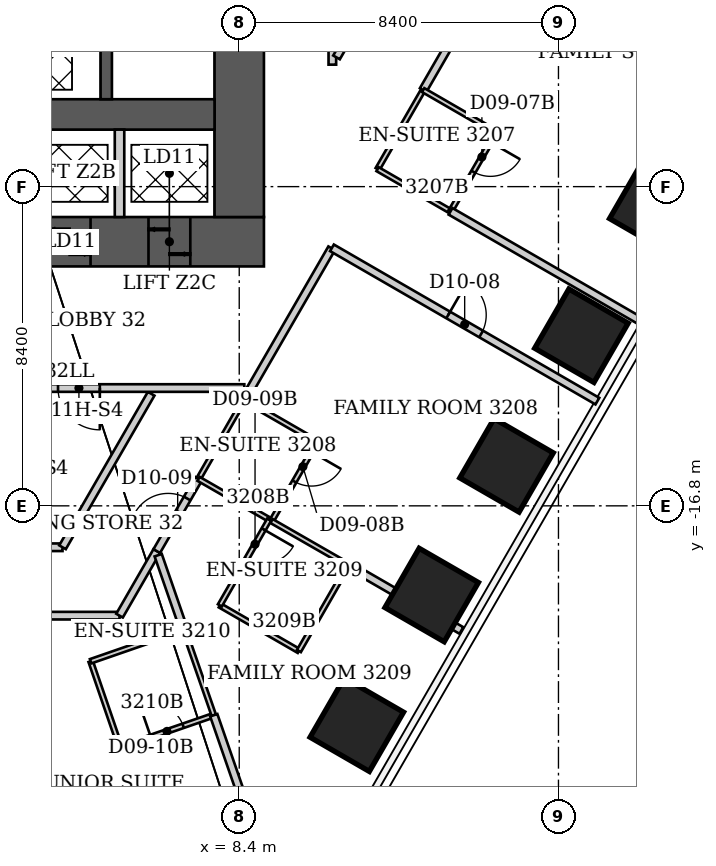
"""IFC4 building model, lengths in metres.
Left out: names, types, materials, properties, quantities, classifications, styles, units other than length and angle.
Written with IfcOpenShell. Run it as: python <this file> out.ifc"""

import sys

from ifc_helpers import new_model, si_unit, direction, frame, frame_2d, origin, origin_2d, place, context, subcontext, project, spatial, rectangle, extrude, element, fill, save


model = new_model("IFC4")
c1 = context("Model", 3, precision=1e-05, world=origin(), true_north=direction((0.0, 1.0)))
c2 = subcontext(c1, "Body", "Model", "MODEL_VIEW")
j1 = project(units=[si_unit("LENGTHUNIT", "METRE"), si_unit("PLANEANGLEUNIT", "RADIAN")], contexts=[c1])
p1 = place(None, origin())
s1 = spatial("IfcSite", under=j1, at=p1, CompositionType="ELEMENT")
p2 = place(p1, origin())
s2 = spatial("IfcBuilding", under=s1, at=p2, CompositionType="ELEMENT")
p3 = place(p2, frame((0.0, 0.0, 131.0)))
s3 = spatial("IfcBuildingStorey", under=s2, at=p3, CompositionType="ELEMENT", Elevation=131.0)
for number, where, z_axis, x_axis in (
    (1, (19.374, -8.911, 0.0), (0.0, 0.0, 1.0), (0.866, -0.5, 0.0)),
    (2, (17.404, -12.323, 0.0), (0.0, 0.0, 1.0), (0.866, -0.5, 0.0)),
    (3, (15.434, -15.735, 0.0), (0.0, 0.0, 1.0), (0.866, -0.5, 0.0)),
    (4, (13.464, -19.147, 0.0), (0.0, 0.0, 1.0), (0.866, -0.5, 0.0)),
    (5, (11.494, -22.559, 0.0), (0.0, 0.0, 1.0), (0.866, -0.5, 0.0)),
):
    element("IfcColumn", number, at=place(p3, frame(where, z_axis=z_axis, x_axis=x_axis)), inside=s3, PredefinedType="COLUMN", context=c2, shape_type="SweptSolid", body=[
        extrude(rectangle(XDim=1.8, YDim=1.8, at=origin_2d()), origin(), (0.0, 0.0, 1.0), 3.8),
    ])
p4 = place(p3, frame((-9.05, -9.85, 0.0), z_axis=(0.0, 0.0, 1.0), x_axis=(1.0, 0.0, 0.0)))
e6 = element("IfcWall", 6, at=p4, inside=s3, PredefinedType="SHEAR", context=c2, shape_type="SweptSolid", body=[
    extrude(rectangle(XDim=18.1, YDim=1.3, at=frame_2d((9.05, 0.0))), origin(), (0.0, 0.0, 1.0), 3.8),
])
p5 = place(p4, frame((1.938, 0.0, 0.0)))
e7 = element("IfcOpeningElement", 7, at=p5, cuts=e6, PredefinedType="OPENING", context=c2, shape_type="SweptSolid", body=[
    extrude(rectangle(XDim=1.1, YDim=2.2, at=frame_2d((0.55, 1.1))), frame((0.0, 0.65, 0.0), z_axis=(0.0, -1.0, 0.0), x_axis=(1.0, 0.0, 0.0)), (0.0, 0.0, 1.0), 1.3),
])
p6 = place(p4, frame((9.812, 0.0, 0.0)))
e8 = element("IfcOpeningElement", 8, at=p6, cuts=e6, PredefinedType="OPENING", context=c2, shape_type="SweptSolid", body=[
    extrude(rectangle(XDim=1.1, YDim=2.1, at=frame_2d((0.55, 1.05))), frame((0.0, 0.65, 0.0), z_axis=(0.0, -1.0, 0.0), x_axis=(1.0, 0.0, 0.0)), (0.0, 0.0, 1.0), 1.3),
])
p7 = place(p4, frame((12.438, 0.0, 0.0)))
e9 = element("IfcOpeningElement", 9, at=p7, cuts=e6, PredefinedType="OPENING", context=c2, shape_type="SweptSolid", body=[
    extrude(rectangle(XDim=1.1, YDim=2.1, at=frame_2d((0.55, 1.05))), frame((0.0, 0.65, 0.0), z_axis=(0.0, -1.0, 0.0), x_axis=(1.0, 0.0, 0.0)), (0.0, 0.0, 1.0), 1.3),
])
p8 = place(p4, frame((15.062, 0.0, 0.0)))
e10 = element("IfcOpeningElement", 10, at=p8, cuts=e6, PredefinedType="OPENING", context=c2, shape_type="SweptSolid", body=[
    extrude(rectangle(XDim=1.1, YDim=2.1, at=frame_2d((0.55, 1.05))), frame((0.0, 0.65, 0.0), z_axis=(0.0, -1.0, 0.0), x_axis=(1.0, 0.0, 0.0)), (0.0, 0.0, 1.0), 1.3),
])
p9 = place(p3, frame((8.4, -9.2, 0.0), z_axis=(0.0, 0.0, 1.0), x_axis=(0.0, 1.0, 0.0)))
e11 = element("IfcWall", 11, at=p9, inside=s3, PredefinedType="SHEAR", context=c2, shape_type="SweptSolid", body=[
    extrude(rectangle(XDim=15.3, YDim=1.3, at=frame_2d((7.65, 0.0))), origin(), (0.0, 0.0, 1.0), 3.8),
])
p10 = place(p9, frame((10.7, 0.0, 0.0)))
e12 = element("IfcOpeningElement", 12, at=p10, cuts=e11, PredefinedType="OPENING", context=c2, shape_type="SweptSolid", body=[
    extrude(rectangle(XDim=1.2, YDim=2.2, at=frame_2d((0.6, 1.1))), frame((0.0, 0.65, 0.0), z_axis=(0.0, -1.0, 0.0), x_axis=(1.0, 0.0, 0.0)), (0.0, 0.0, 1.0), 1.3),
])
p11 = place(p3, frame((-7.75, -6.5, 0.0), z_axis=(0.0, 0.0, 1.0), x_axis=(1.0, 0.0, 0.0)))
e13 = element("IfcWall", 13, at=p11, inside=s3, PredefinedType="SHEAR", context=c2, shape_type="SweptSolid", body=[
    extrude(rectangle(XDim=15.5, YDim=0.8, at=frame_2d((7.75, 0.0))), origin(), (0.0, 0.0, 1.0), 3.8),
])
p12 = place(p3, frame((4.9, -6.1, 0.0), z_axis=(0.0, 0.0, 1.0), x_axis=(0.0, 1.0, 0.0)))
e14 = element("IfcWall", 14, at=p12, inside=s3, PredefinedType="SHEAR", context=c2, shape_type="SweptSolid", body=[
    extrude(rectangle(XDim=7.2, YDim=0.3, at=frame_2d((3.6, 0.0))), origin(), (0.0, 0.0, 1.0), 3.8),
])
p13 = place(p3, frame((5.25, -9.2, 0.0), z_axis=(0.0, 0.0, 1.0), x_axis=(0.0, 1.0, 0.0)))
e15 = element("IfcWall", 15, at=p13, inside=s3, PredefinedType="PARTITIONING", context=c2, shape_type="SweptSolid", body=[
    extrude(rectangle(XDim=2.3, YDim=0.25, at=frame_2d((1.15, 0.0))), origin(), (0.0, 0.0, 1.0), 3.8),
])
p14 = place(p3, frame((1.215, -19.69, 0.0), z_axis=(0.0, 0.0, 1.0), x_axis=(1.0, 0.0, 0.0)))
e16 = element("IfcWall", 16, at=p14, inside=s3, PredefinedType="PARTITIONING", context=c2, shape_type="SweptSolid", body=[
    extrude(rectangle(XDim=4.035, YDim=0.2, at=frame_2d((2.018, 0.0))), origin(), (0.0, 0.0, 1.0), 3.64),
])
p15 = place(p3, frame((3.75, -17.89, 0.0), z_axis=(0.0, 0.0, 1.0), x_axis=(-1.0, 0.0, 0.0)))
e17 = element("IfcWall", 17, at=p15, inside=s3, PredefinedType="PARTITIONING", context=c2, shape_type="SweptSolid", body=[
    extrude(rectangle(XDim=2.15, YDim=0.2, at=frame_2d((1.075, 0.0))), origin(), (0.0, 0.0, 1.0), 3.64),
])
p16 = place(p3, frame((4.49, -20.89, 0.0), z_axis=(0.0, 0.0, 1.0), x_axis=(0.324971746724, -0.945723724896, 0.0)))
e18 = element("IfcWall", 18, at=p16, inside=s3, PredefinedType="PARTITIONING", context=c2, shape_type="SweptSolid", body=[
    extrude(rectangle(XDim=2.4, YDim=0.12, at=frame_2d((1.2, 0.0))), origin(), (0.0, 0.0, 1.0), 3.64),
])
p17 = place(p3, frame((5.25, -19.69, 0.0), z_axis=(0.0, 0.0, 1.0), x_axis=(0.499431599995, 0.866353321068, 0.0)))
e19 = element("IfcWall", 19, at=p17, inside=s3, PredefinedType="PARTITIONING", context=c2, shape_type="SweptSolid", body=[
    extrude(rectangle(XDim=1.962, YDim=0.2, at=frame_2d((0.981, 0.0))), origin(), (0.0, 0.0, 1.0), 3.64),
])
p18 = place(p3, frame((5.27, -23.16, 0.0), z_axis=(0.0, 0.0, 1.0), x_axis=(0.945184415197, 0.326537013627, 0.0)))
e20 = element("IfcWall", 20, at=p18, inside=s3, PredefinedType="PARTITIONING", context=c2, shape_type="SweptSolid", body=[
    extrude(rectangle(XDim=2.603, YDim=0.12, at=frame_2d((1.301, 0.0))), origin(), (0.0, 0.0, 1.0), 3.64),
])
p19 = place(p18, frame((0.85, 0.0, 0.0)))
e21 = element("IfcOpeningElement", 21, at=p19, cuts=e20, PredefinedType="OPENING", context=c2, shape_type="SweptSolid", body=[
    extrude(rectangle(XDim=0.9, YDim=2.03, at=frame_2d((0.45, 1.015))), frame((0.0, 0.06, 0.0), z_axis=(0.0, -1.0, 0.0), x_axis=(1.0, 0.0, 0.0)), (0.0, 0.0, 1.0), 0.12),
])
p20 = place(p3, frame((6.083, -13.85, 0.0), z_axis=(0.0, 0.0, 1.0), x_axis=(-0.499977643516, -0.866038310922, 0.0)))
e22 = element("IfcWall", 22, at=p20, inside=s3, PredefinedType="PARTITIONING", context=c2, shape_type="SweptSolid", body=[
    extrude(rectangle(XDim=4.665, YDim=0.2, at=frame_2d((2.333, 0.0))), origin(), (0.0, 0.0, 1.0), 3.64),
])
p21 = place(p3, frame((6.23, -17.99, 0.0), z_axis=(0.0, 0.0, 1.0), x_axis=(0.500957366999, 0.865471961677, 0.0)))
e23 = element("IfcWall", 23, at=p21, inside=s3, PredefinedType="PARTITIONING", context=c2, shape_type="SweptSolid", body=[
    extrude(rectangle(XDim=2.196, YDim=0.2, at=frame_2d((1.098, 0.0))), origin(), (0.0, 0.0, 1.0), 3.64),
])
p22 = place(p21, frame((0.598, 0.0, 0.0)))
e24 = element("IfcOpeningElement", 24, at=p22, cuts=e23, PredefinedType="OPENING", context=c2, shape_type="SweptSolid", body=[
    extrude(rectangle(XDim=1.0, YDim=2.13, at=frame_2d((0.5, 1.065))), frame((0.0, 0.1, 0.0), z_axis=(0.0, -1.0, 0.0), x_axis=(1.0, 0.0, 0.0)), (0.0, 0.0, 1.0), 0.2),
])
p23 = place(p3, frame((6.268, -18.099, 0.0), z_axis=(0.0, 0.0, 1.0), x_axis=(0.327257488288, -0.944935202202, 0.0)))
e25 = element("IfcWall", 25, at=p23, inside=s3, PredefinedType="PARTITIONING", context=c2, shape_type="SweptSolid", body=[
    extrude(rectangle(XDim=2.054, YDim=0.2, at=frame_2d((1.027, 0.0))), origin(), (0.0, 0.0, 1.0), 3.64),
])
p24 = place(p3, frame((6.94, -20.04, 0.0), z_axis=(0.0, 0.0, 1.0), x_axis=(-0.944772080486, -0.327728112822, 0.0)))
e26 = element("IfcWall", 26, at=p24, inside=s3, PredefinedType="PARTITIONING", context=c2, shape_type="SweptSolid", body=[
    extrude(rectangle(XDim=2.593, YDim=0.12, at=frame_2d((1.297, 0.0))), origin(), (0.0, 0.0, 1.0), 3.64),
])
p25 = place(p3, frame((6.94, -20.04, 0.0), z_axis=(0.0, 0.0, 1.0), x_axis=(0.328693963496, -0.944436487203, 0.0)))
e27 = element("IfcWall", 27, at=p25, inside=s3, PredefinedType="PARTITIONING", context=c2, shape_type="SweptSolid", body=[
    extrude(rectangle(XDim=2.404, YDim=0.12, at=frame_2d((1.202, 0.0))), origin(), (0.0, 0.0, 1.0), 3.64),
])
p26 = place(p3, frame((7.33, -16.09, 0.0), z_axis=(0.0, 0.0, 1.0), x_axis=(0.498475244549, 0.866903933877, 0.0)))
e28 = element("IfcWall", 28, at=p26, inside=s3, PredefinedType="PARTITIONING", context=c2, shape_type="SweptSolid", body=[
    extrude(rectangle(XDim=2.227, YDim=0.12, at=frame_2d((1.113, 0.0))), origin(), (0.0, 0.0, 1.0), 3.64),
])
p27 = place(p3, frame((7.33, -16.09, 0.0), z_axis=(0.0, 0.0, 1.0), x_axis=(0.866825160608, -0.498612214989, 0.0)))
e29 = element("IfcWall", 29, at=p27, inside=s3, PredefinedType="PARTITIONING", context=c2, shape_type="SweptSolid", body=[
    extrude(rectangle(XDim=2.146, YDim=0.12, at=frame_2d((1.073, 0.0))), origin(), (0.0, 0.0, 1.0), 3.64),
])
p28 = place(p3, frame((7.73, -22.31, 0.0), z_axis=(0.0, 0.0, 1.0), x_axis=(0.327284111977, -0.944925981253, 0.0)))
e30 = element("IfcWall", 30, at=p28, inside=s3, PredefinedType="PARTITIONING", context=c2, shape_type="SweptSolid", body=[
    extrude(rectangle(XDim=5.653, YDim=0.2, at=frame_2d((2.826, 0.0))), origin(), (0.0, 0.0, 1.0), 3.64),
])
p29 = place(p3, frame((7.89, -19.42, 0.0), z_axis=(0.0, 0.0, 1.0), x_axis=(0.866202511239, -0.499693115345, 0.0)))
e31 = element("IfcWall", 31, at=p29, inside=s3, PredefinedType="PARTITIONING", context=c2, shape_type="SweptSolid", body=[
    extrude(rectangle(XDim=2.401, YDim=0.12, at=frame_2d((1.201, 0.0))), origin(), (0.0, 0.0, 1.0), 3.64),
])
p30 = place(p3, frame((8.44, -14.16, 0.0), z_axis=(0.0, 0.0, 1.0), x_axis=(0.515111490125, 0.857123184111, 0.0)))
e32 = element("IfcWall", 32, at=p30, inside=s3, PredefinedType="PARTITIONING", context=c2, shape_type="SweptSolid", body=[
    extrude(rectangle(XDim=0.175, YDim=0.12, at=frame_2d((0.087, 0.0))), origin(), (0.0, 0.0, 1.0), 3.64),
])
p31 = place(p3, frame((8.53, -14.01, 0.0), z_axis=(0.0, 0.0, 1.0), x_axis=(0.500091179446, 0.865972754907, 0.0)))
e33 = element("IfcWall", 33, at=p31, inside=s3, PredefinedType="PARTITIONING", context=c2, shape_type="SweptSolid", body=[
    extrude(rectangle(XDim=4.604, YDim=0.2, at=frame_2d((2.302, 0.0))), origin(), (0.0, 0.0, 1.0), 3.64),
])
p32 = place(p3, frame((8.534, -13.7, 0.0), z_axis=(0.0, 0.0, 1.0), x_axis=(-1.0, 0.0, 0.0)))
e34 = element("IfcWall", 34, at=p32, inside=s3, PredefinedType="PARTITIONING", context=c2, shape_type="SweptSolid", body=[
    extrude(rectangle(XDim=8.704, YDim=0.2, at=frame_2d((4.352, 0.0))), origin(), (0.0, 0.0, 1.0), 3.64),
])
p33 = place(p32, frame((3.802, 0.0, 0.0)))
e35 = element("IfcOpeningElement", 35, at=p33, cuts=e34, PredefinedType="OPENING", context=c2, shape_type="SweptSolid", body=[
    extrude(rectangle(XDim=1.1, YDim=2.2, at=frame_2d((0.55, 1.1))), frame((0.0, 0.1, 0.0), z_axis=(0.0, -1.0, 0.0), x_axis=(1.0, 0.0, 0.0)), (0.0, 0.0, 1.0), 0.2),
])
p34 = place(p3, frame((9.19, -17.16, 0.0), z_axis=(0.0, 0.0, 1.0), x_axis=(-0.498627694264, -0.866816256489, 0.0)))
e36 = element("IfcWall", 36, at=p34, inside=s3, PredefinedType="PARTITIONING", context=c2, shape_type="SweptSolid", body=[
    extrude(rectangle(XDim=2.607, YDim=0.12, at=frame_2d((1.304, 0.0))), origin(), (0.0, 0.0, 1.0), 3.64),
])
p35 = place(p34, frame((0.3, 0.0, 0.0)))
e37 = element("IfcOpeningElement", 37, at=p35, cuts=e36, PredefinedType="OPENING", context=c2, shape_type="SweptSolid", body=[
    extrude(rectangle(XDim=0.9, YDim=2.03, at=frame_2d((0.45, 1.015))), frame((0.0, 0.06, 0.0), z_axis=(0.0, -1.0, 0.0), x_axis=(1.0, 0.0, 0.0)), (0.0, 0.0, 1.0), 0.12),
])
p36 = place(p3, frame((9.25, -17.2, 0.0), z_axis=(0.0, 0.0, 1.0), x_axis=(0.499737123639, 0.866177122335, 0.0)))
e38 = element("IfcWall", 38, at=p36, inside=s3, PredefinedType="PARTITIONING", context=c2, shape_type="SweptSolid", body=[
    extrude(rectangle(XDim=2.401, YDim=0.12, at=frame_2d((1.201, 0.0))), origin(), (0.0, 0.0, 1.0), 3.64),
])
p37 = place(p36, frame((1.201, 0.0, 0.0)))
e39 = element("IfcOpeningElement", 39, at=p37, cuts=e38, PredefinedType="OPENING", context=c2, shape_type="SweptSolid", body=[
    extrude(rectangle(XDim=0.9, YDim=2.03, at=frame_2d((0.45, 1.015))), frame((0.0, 0.06, 0.0), z_axis=(0.0, -1.0, 0.0), x_axis=(1.0, 0.0, 0.0)), (0.0, 0.0, 1.0), 0.12),
])
p38 = place(p3, frame((9.25, -17.2, 0.0), z_axis=(0.0, 0.0, 1.0), x_axis=(0.867157547908, -0.498033921641, 0.0)))
e40 = element("IfcWall", 40, at=p38, inside=s3, PredefinedType="PARTITIONING", context=c2, shape_type="SweptSolid", body=[
    extrude(rectangle(XDim=2.33, YDim=0.12, at=frame_2d((1.165, 0.0))), origin(), (0.0, 0.0, 1.0), 3.64),
])
p39 = place(p3, frame((9.97, -20.62, 0.0), z_axis=(0.0, 0.0, 1.0), x_axis=(0.498627694264, 0.866816256489, 0.0)))
e41 = element("IfcWall", 41, at=p39, inside=s3, PredefinedType="PARTITIONING", context=c2, shape_type="SweptSolid", body=[
    extrude(rectangle(XDim=2.607, YDim=0.12, at=frame_2d((1.304, 0.0))), origin(), (0.0, 0.0, 1.0), 3.64),
])
p40 = place(p3, frame((10.45, -15.12, 0.0), z_axis=(0.0, 0.0, 1.0), x_axis=(-0.865705017107, 0.500554515868, 0.0)))
e42 = element("IfcWall", 42, at=p40, inside=s3, PredefinedType="PARTITIONING", context=c2, shape_type="SweptSolid", body=[
    extrude(rectangle(XDim=2.218, YDim=0.12, at=frame_2d((1.109, 0.0))), origin(), (0.0, 0.0, 1.0), 3.023),
])
p41 = place(p3, frame((10.84, -10.01, 0.0), z_axis=(0.0, 0.0, 1.0), x_axis=(0.86587701925, -0.500256921525, 0.0)))
e43 = element("IfcWall", 43, at=p41, inside=s3, PredefinedType="PARTITIONING", context=c2, shape_type="SweptSolid", body=[
    extrude(rectangle(XDim=8.066, YDim=0.2, at=frame_2d((4.033, 0.0))), origin(), (0.0, 0.0, 1.0), 3.64),
])
p42 = place(p41, frame((3.533, 0.0, 0.0)))
e44 = element("IfcOpeningElement", 44, at=p42, cuts=e43, PredefinedType="OPENING", context=c2, shape_type="SweptSolid", body=[
    extrude(rectangle(XDim=1.0, YDim=2.13, at=frame_2d((0.5, 1.065))), frame((0.0, 0.1, 0.0), z_axis=(0.0, -1.0, 0.0), x_axis=(1.0, 0.0, 0.0)), (0.0, 0.0, 1.0), 0.2),
])
p43 = place(p3, frame((10.85, -5.19, 0.0), z_axis=(0.0, 0.0, 1.0), x_axis=(0.0, 1.0, 0.0)))
e45 = element("IfcWall", 45, at=p43, inside=s3, PredefinedType="PARTITIONING", context=c2, shape_type="SweptSolid", body=[
    extrude(rectangle(XDim=14.39, YDim=0.2, at=frame_2d((7.195, 0.0))), origin(), (0.0, 0.0, 1.0), 3.64),
])
p44 = place(p43, frame((6.645, 0.0, 0.0)))
e46 = element("IfcOpeningElement", 46, at=p44, cuts=e45, PredefinedType="OPENING", context=c2, shape_type="SweptSolid", body=[
    extrude(rectangle(XDim=1.1, YDim=2.2, at=frame_2d((0.55, 1.1))), frame((0.0, 0.1, 0.0), z_axis=(0.0, -1.0, 0.0), x_axis=(1.0, 0.0, 0.0)), (0.0, 0.0, 1.0), 0.2),
])
p45 = place(p3, frame((11.27, -18.36, 0.0), z_axis=(0.0, 0.0, 1.0), x_axis=(0.865806952829, -0.500378177414, 0.0)))
e47 = element("IfcWall", 47, at=p45, inside=s3, PredefinedType="PARTITIONING", context=c2, shape_type="SweptSolid", body=[
    extrude(rectangle(XDim=3.437, YDim=0.2, at=frame_2d((1.719, 0.0))), origin(), (0.0, 0.0, 1.0), 3.64),
])
p46 = place(p3, frame((12.04, -7.94, 0.0), z_axis=(0.0, 0.0, 1.0), x_axis=(0.499737123639, 0.866177122335, 0.0)))
e48 = element("IfcWall", 48, at=p46, inside=s3, PredefinedType="PARTITIONING", context=c2, shape_type="SweptSolid", body=[
    extrude(rectangle(XDim=2.401, YDim=0.12, at=frame_2d((1.201, 0.0))), origin(), (0.0, 0.0, 1.0), 3.64),
])
p47 = place(p3, frame((12.04, -7.94, 0.0), z_axis=(0.0, 0.0, 1.0), x_axis=(0.865705017107, -0.500554515868, 0.0)))
e49 = element("IfcWall", 49, at=p47, inside=s3, PredefinedType="PARTITIONING", context=c2, shape_type="SweptSolid", body=[
    extrude(rectangle(XDim=2.218, YDim=0.12, at=frame_2d((1.109, 0.0))), origin(), (0.0, 0.0, 1.0), 3.64),
])
p48 = place(p3, frame((13.24, -5.86, 0.0), z_axis=(0.0, 0.0, 1.0), x_axis=(0.500093306236, 0.865971526701, 0.0)))
e50 = element("IfcWall", 50, at=p48, inside=s3, PredefinedType="PARTITIONING", context=c2, shape_type="SweptSolid", body=[
    extrude(rectangle(XDim=8.719, YDim=0.2, at=frame_2d((4.359, 0.0))), origin(), (0.0, 0.0, 1.0), 3.64),
])
p49 = place(p48, frame((3.859, 0.0, 0.0)))
e51 = element("IfcOpeningElement", 51, at=p49, cuts=e50, PredefinedType="OPENING", context=c2, shape_type="SweptSolid", body=[
    extrude(rectangle(XDim=1.0, YDim=2.13, at=frame_2d((0.5, 1.065))), frame((0.0, 0.1, 0.0), z_axis=(0.0, -1.0, 0.0), x_axis=(1.0, 0.0, 0.0)), (0.0, 0.0, 1.0), 0.2),
])
p50 = place(p3, frame((13.96, -9.05, 0.0), z_axis=(0.0, 0.0, 1.0), x_axis=(0.499693115345, 0.866202511239, 0.0)))
e52 = element("IfcWall", 52, at=p50, inside=s3, PredefinedType="PARTITIONING", context=c2, shape_type="SweptSolid", body=[
    extrude(rectangle(XDim=2.401, YDim=0.12, at=frame_2d((1.201, 0.0))), origin(), (0.0, 0.0, 1.0), 3.64),
])
p51 = place(p50, frame((1.201, 0.0, 0.0)))
e53 = element("IfcOpeningElement", 53, at=p51, cuts=e52, PredefinedType="OPENING", context=c2, shape_type="SweptSolid", body=[
    extrude(rectangle(XDim=0.9, YDim=2.03, at=frame_2d((0.45, 1.015))), frame((0.0, 0.06, 0.0), z_axis=(0.0, -1.0, 0.0), x_axis=(1.0, 0.0, 0.0)), (0.0, 0.0, 1.0), 0.12),
])
p52 = place(p3, frame((13.96, -9.05, 0.0), z_axis=(0.0, 0.0, 1.0), x_axis=(0.865934584664, -0.500157270349, 0.0)))
e54 = element("IfcWall", 54, at=p52, inside=s3, PredefinedType="PARTITIONING", context=c2, shape_type="SweptSolid", body=[
    extrude(rectangle(XDim=5.848, YDim=0.2, at=frame_2d((2.924, 0.0))), origin(), (0.0, 0.0, 1.0), 3.64),
])
p53 = place(p3, frame((15.16, -6.97, 0.0), z_axis=(0.0, 0.0, 1.0), x_axis=(-0.865705017107, 0.500554515868, 0.0)))
e55 = element("IfcWall", 55, at=p53, inside=s3, PredefinedType="PARTITIONING", context=c2, shape_type="SweptSolid", body=[
    extrude(rectangle(XDim=2.218, YDim=0.12, at=frame_2d((1.109, 0.0))), origin(), (0.0, 0.0, 1.0), 3.64),
])
p54 = place(p3, frame((16.56, 4.7, 0.0), z_axis=(0.0, 0.0, 1.0), x_axis=(-0.500007375767, -0.866021145342, 0.0)))
e56 = element("IfcWall", 56, at=p54, inside=s3, PredefinedType="PARTITIONING", context=c2, shape_type="SweptSolid", body=[
    extrude(rectangle(XDim=11.2, YDim=0.2, at=frame_2d((5.6, 0.0))), origin(), (0.0, 0.0, 1.0), 3.64),
])
p55 = place(p51, origin())
e57 = element("IfcDoor", 57, at=p55, inside=s3, OperationType="SINGLE_SWING_RIGHT", PredefinedType="DOOR", context=c2, shape_type="SweptSolid", body=[
    extrude(rectangle(XDim=0.9, YDim=2.03, at=frame_2d((0.45, 1.015))), frame((0.0, 0.025, 0.0), z_axis=(0.0, -1.0, 0.0), x_axis=(1.0, 0.0, 0.0)), (0.0, 0.0, 1.0), 0.05),
])
fill(e53, e57)
p56 = place(p42, origin())
e58 = element("IfcDoor", 58, at=p56, inside=s3, OperationType="SINGLE_SWING_LEFT", PredefinedType="DOOR", context=c2, shape_type="SweptSolid", body=[
    extrude(rectangle(XDim=1.0, YDim=2.13, at=frame_2d((0.5, 1.065))), frame((0.0, 0.025, 0.0), z_axis=(0.0, -1.0, 0.0), x_axis=(1.0, 0.0, 0.0)), (0.0, 0.0, 1.0), 0.05),
])
fill(e44, e58)
p57 = place(p37, origin())
e59 = element("IfcDoor", 59, at=p57, inside=s3, OperationType="SINGLE_SWING_RIGHT", PredefinedType="DOOR", context=c2, shape_type="SweptSolid", body=[
    extrude(rectangle(XDim=0.9, YDim=2.03, at=frame_2d((0.45, 1.015))), frame((0.0, 0.025, 0.0), z_axis=(0.0, -1.0, 0.0), x_axis=(1.0, 0.0, 0.0)), (0.0, 0.0, 1.0), 0.05),
])
fill(e39, e59)
p58 = place(p22, origin())
e60 = element("IfcDoor", 60, at=p58, inside=s3, OperationType="SINGLE_SWING_LEFT", PredefinedType="DOOR", context=c2, shape_type="SweptSolid", body=[
    extrude(rectangle(XDim=1.0, YDim=2.13, at=frame_2d((0.5, 1.065))), frame((0.0, 0.025, 0.0), z_axis=(0.0, -1.0, 0.0), x_axis=(1.0, 0.0, 0.0)), (0.0, 0.0, 1.0), 0.05),
])
fill(e24, e60)
p59 = place(p35, origin())
e61 = element("IfcDoor", 61, at=p59, inside=s3, OperationType="SINGLE_SWING_LEFT", PredefinedType="DOOR", context=c2, shape_type="SweptSolid", body=[
    extrude(rectangle(XDim=0.9, YDim=2.03, at=frame_2d((0.45, 1.015))), frame((0.0, 0.025, 0.0), z_axis=(0.0, -1.0, 0.0), x_axis=(1.0, 0.0, 0.0)), (0.0, 0.0, 1.0), 0.05),
])
fill(e37, e61)
p60 = place(p19, origin())
e62 = element("IfcDoor", 62, at=p60, inside=s3, OperationType="SINGLE_SWING_LEFT", PredefinedType="DOOR", context=c2, shape_type="SweptSolid", body=[
    extrude(rectangle(XDim=0.9, YDim=2.03, at=frame_2d((0.45, 1.015))), frame((0.0, 0.025, 0.0), z_axis=(0.0, -1.0, 0.0), x_axis=(1.0, 0.0, 0.0)), (0.0, 0.0, 1.0), 0.05),
])
fill(e21, e62)
p61 = place(p33, origin())
e63 = element("IfcDoor", 63, at=p61, inside=s3, OperationType="SINGLE_SWING_LEFT", PredefinedType="DOOR", context=c2, shape_type="SweptSolid", body=[
    extrude(rectangle(XDim=1.1, YDim=2.2, at=frame_2d((0.55, 1.1))), frame((0.0, 0.025, 0.0), z_axis=(0.0, -1.0, 0.0), x_axis=(1.0, 0.0, 0.0)), (0.0, 0.0, 1.0), 0.05),
])
fill(e35, e63)
p62 = place(p7, origin())
e64 = element("IfcDoor", 64, at=p62, inside=s3, OperationType="DOUBLE_DOOR_SLIDING", PredefinedType="DOOR", context=c2, shape_type="SweptSolid", body=[
    extrude(rectangle(XDim=1.1, YDim=2.1, at=frame_2d((0.55, 1.05))), frame((0.0, 0.025, 0.0), z_axis=(0.0, -1.0, 0.0), x_axis=(1.0, 0.0, 0.0)), (0.0, 0.0, 1.0), 0.05),
])
fill(e9, e64)
p63 = place(p8, origin())
e65 = element("IfcDoor", 65, at=p63, inside=s3, OperationType="DOUBLE_DOOR_SLIDING", PredefinedType="DOOR", context=c2, shape_type="SweptSolid", body=[
    extrude(rectangle(XDim=1.1, YDim=2.1, at=frame_2d((0.55, 1.05))), frame((0.0, 0.025, 0.0), z_axis=(0.0, -1.0, 0.0), x_axis=(1.0, 0.0, 0.0)), (0.0, 0.0, 1.0), 0.05),
])
fill(e10, e65)
save(model, sys.argv[1])
